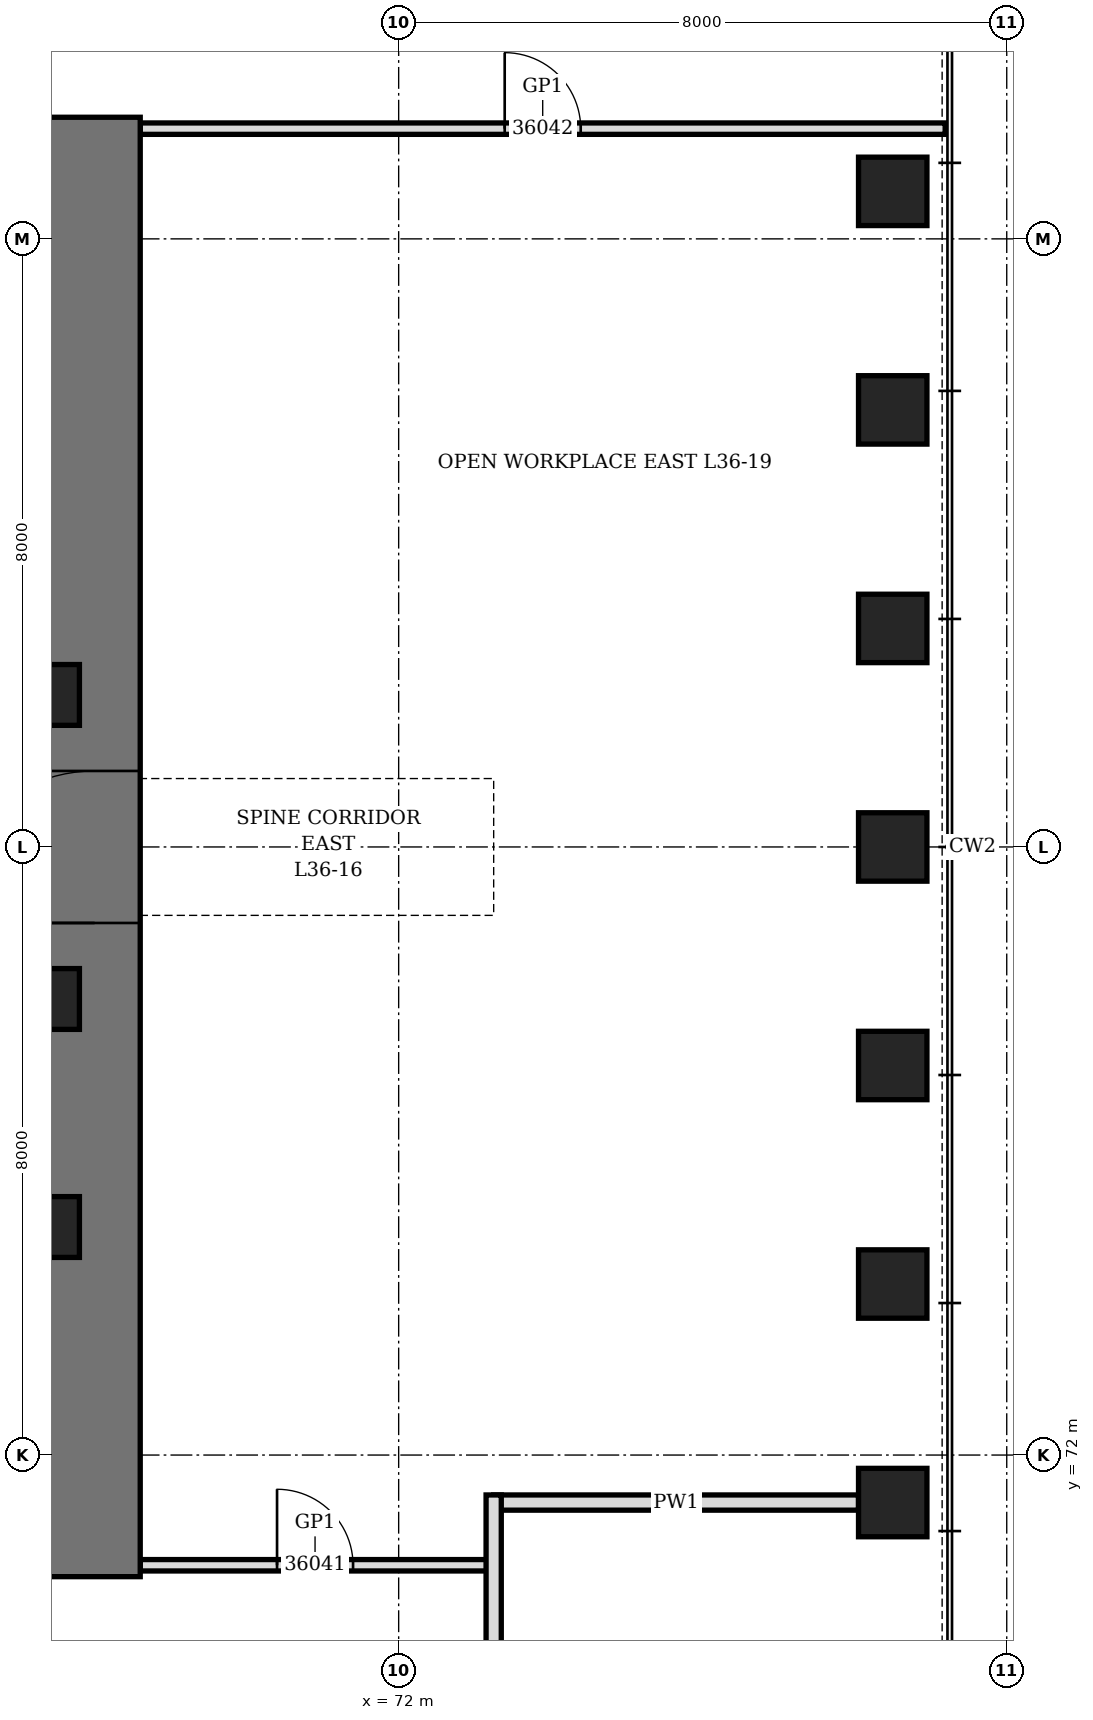
"""IFC4 building model, lengths in metres.
Left out: names, types, materials, properties, quantities, classifications, styles, units other than length and angle.
Written with IfcOpenShell. Run it as: python <this file> out.ifc"""

import sys

from ifc_helpers import new_model, si_unit, direction, frame, frame_2d, origin, origin_2d, place, context, subcontext, project, spatial, rectangle, hollow_rectangle, extrude, element, fill, save


model = new_model("IFC4")
c1 = context("Model", 3, precision=1e-05, world=origin(), true_north=direction((0.0, 1.0)))
c2 = subcontext(c1, "Body", "Model", "MODEL_VIEW")
j1 = project(units=[si_unit("LENGTHUNIT", "METRE"), si_unit("PLANEANGLEUNIT", "RADIAN")], contexts=[c1])
p1 = place(None, origin())
s1 = spatial("IfcSite", under=j1, at=p1, CompositionType="ELEMENT")
p2 = place(p1, origin())
s2 = spatial("IfcBuilding", under=s1, at=p2, CompositionType="ELEMENT")
p3 = place(p2, frame((0.0, 0.0, 162.7)))
s3 = spatial("IfcBuildingStorey", under=s2, at=p3, CompositionType="ELEMENT", Elevation=162.7)
for number, where, z_axis, x_axis in (
    (1, (78.5, 71.375, 0.0), (0.0, 0.0, 1.0), (0.0, 1.0, 0.0)),
    (2, (78.5, 74.25, 0.0), (0.0, 0.0, 1.0), (0.0, 1.0, 0.0)),
    (3, (78.5, 77.125, 0.0), (0.0, 0.0, 1.0), (0.0, 1.0, 0.0)),
    (4, (78.5, 80.0, 0.0), (0.0, 0.0, 1.0), (0.0, 1.0, 0.0)),
    (5, (78.5, 82.875, 0.0), (0.0, 0.0, 1.0), (0.0, 1.0, 0.0)),
    (6, (78.5, 85.75, 0.0), (0.0, 0.0, 1.0), (0.0, 1.0, 0.0)),
    (7, (78.5, 88.625, 0.0), (0.0, 0.0, 1.0), (0.0, 1.0, 0.0)),
):
    element("IfcColumn", number, at=place(p3, frame(where, z_axis=z_axis, x_axis=x_axis)), inside=s3, PredefinedType="COLUMN", context=c2, shape_type="SweptSolid", body=[
        extrude(hollow_rectangle(XDim=0.9, YDim=0.9, WallThickness=0.12, at=origin_2d()), origin(), (0.0, 0.0, 1.0), 4.2),
    ])
p4 = place(p3, frame((68.0, 70.4, 0.0), z_axis=(0.0, 0.0, 1.0), x_axis=(0.0, 1.0, 0.0)))
e8 = element("IfcWall", 8, at=p4, inside=s3, PredefinedType="SHEAR", context=c2, shape_type="SweptSolid", body=[
    extrude(rectangle(XDim=19.2, YDim=1.2, at=frame_2d((9.6, 0.0))), origin(), (0.0, 0.0, 1.0), 4.2),
])
p5 = place(p4, frame((8.6, 0.0, 0.0)))
e9 = element("IfcOpeningElement", 9, at=p5, cuts=e8, PredefinedType="OPENING", context=c2, shape_type="SweptSolid", body=[
    extrude(rectangle(XDim=2.0, YDim=2.4, at=frame_2d((1.0, 1.2))), frame((0.0, 0.61, 0.0), z_axis=(0.0, -1.0, 0.0), x_axis=(1.0, 0.0, 0.0)), (0.0, 0.0, 1.0), 1.22),
])
for number, where, z_axis, x_axis in (
    (10, (67.4, 75.0, 0.0), (0.0, 0.0, 1.0), (1.0, 0.0, 0.0)),
    (11, (67.4, 78.0, 0.0), (0.0, 0.0, 1.0), (1.0, 0.0, 0.0)),
    (12, (67.4, 82.0, 0.0), (0.0, 0.0, 1.0), (1.0, 0.0, 0.0)),
):
    element("IfcColumn", number, at=place(p3, frame(where, z_axis=z_axis, x_axis=x_axis)), inside=s3, PredefinedType="COLUMN", context=c2, shape_type="SweptSolid", body=[
        extrude(hollow_rectangle(XDim=0.8, YDim=0.8, WallThickness=0.1, at=origin_2d()), origin(), (0.0, 0.0, 1.0), 4.2),
    ])
p6 = place(p3, frame((73.25, 71.375, 0.0), z_axis=(0.0, 0.0, 1.0), x_axis=(1.0, 0.0, 0.0)))
e13 = element("IfcWall", 13, at=p6, inside=s3, PredefinedType="PARTITIONING", context=c2, shape_type="SweptSolid", body=[
    extrude(rectangle(XDim=4.8, YDim=0.2, at=frame_2d((2.4, 0.0))), origin(), (0.0, 0.0, 1.0), 3.428),
])
p7 = place(p3, frame((68.6, 70.55, 0.0), z_axis=(0.0, 0.0, 1.0), x_axis=(1.0, 0.0, 0.0)))
e14 = element("IfcWall", 14, at=p7, inside=s3, PredefinedType="PARTITIONING", context=c2, shape_type="SweptSolid", body=[
    extrude(rectangle(XDim=4.6, YDim=0.15, at=frame_2d((2.3, 0.0))), origin(), (0.0, 0.0, 1.0), 4.04),
])
p8 = place(p7, frame((1.8, 0.0, 0.0)))
e15 = element("IfcOpeningElement", 15, at=p8, cuts=e14, PredefinedType="OPENING", context=c2, shape_type="SweptSolid", body=[
    extrude(rectangle(XDim=1.0, YDim=2.4, at=frame_2d((0.5, 1.2))), frame((0.0, 0.085, 0.0), z_axis=(0.0, -1.0, 0.0), x_axis=(1.0, 0.0, 0.0)), (0.0, 0.0, 1.0), 0.17),
])
p9 = place(p3, frame((68.6, 89.45, 0.0), z_axis=(0.0, 0.0, 1.0), x_axis=(1.0, 0.0, 0.0)))
e16 = element("IfcWall", 16, at=p9, inside=s3, PredefinedType="PARTITIONING", context=c2, shape_type="SweptSolid", body=[
    extrude(rectangle(XDim=10.59, YDim=0.15, at=frame_2d((5.295, 0.0))), origin(), (0.0, 0.0, 1.0), 4.04),
])
p10 = place(p9, frame((4.795, 0.0, 0.0)))
e17 = element("IfcOpeningElement", 17, at=p10, cuts=e16, PredefinedType="OPENING", context=c2, shape_type="SweptSolid", body=[
    extrude(rectangle(XDim=1.0, YDim=2.4, at=frame_2d((0.5, 1.2))), frame((0.0, 0.085, 0.0), z_axis=(0.0, -1.0, 0.0), x_axis=(1.0, 0.0, 0.0)), (0.0, 0.0, 1.0), 0.17),
])
p11 = place(p3, frame((73.25, 63.2, 0.0), z_axis=(0.0, 0.0, 1.0), x_axis=(0.0, 1.0, 0.0)))
e18 = element("IfcWall", 18, at=p11, inside=s3, PredefinedType="PARTITIONING", context=c2, shape_type="SweptSolid", body=[
    extrude(rectangle(XDim=8.275, YDim=0.2, at=frame_2d((4.138, 0.0))), origin(), (0.0, 0.0, 1.0), 4.04),
])
p12 = place(p11, frame((3.363, 0.0, 0.0)))
e19 = element("IfcOpeningElement", 19, at=p12, cuts=e18, PredefinedType="OPENING", context=c2, shape_type="SweptSolid", body=[
    extrude(rectangle(XDim=1.0, YDim=2.1, at=frame_2d((0.5, 1.05))), frame((0.0, 0.11, 0.0), z_axis=(0.0, -1.0, 0.0), x_axis=(1.0, 0.0, 0.0)), (0.0, 0.0, 1.0), 0.22),
])
p13 = place(p5, origin())
e20 = element("IfcDoor", 20, at=p13, inside=s3, OperationType="DOUBLE_DOOR_SINGLE_SWING", PredefinedType="DOOR", context=c2, shape_type="SweptSolid", body=[
    extrude(rectangle(XDim=2.0, YDim=2.4, at=frame_2d((1.0, 1.2))), frame((0.0, 0.35, 0.0), z_axis=(0.0, -1.0, 0.0), x_axis=(1.0, 0.0, 0.0)), (0.0, 0.0, 1.0), 0.7),
])
fill(e9, e20)
p14 = place(p8, origin())
e21 = element("IfcDoor", 21, at=p14, inside=s3, OperationType="SINGLE_SWING_RIGHT", PredefinedType="DOOR", context=c2, shape_type="SweptSolid", body=[
    extrude(rectangle(XDim=1.0, YDim=2.4, at=frame_2d((0.5, 1.2))), frame((0.0, 0.075, 0.0), z_axis=(0.0, -1.0, 0.0), x_axis=(1.0, 0.0, 0.0)), (0.0, 0.0, 1.0), 0.149),
])
fill(e15, e21)
p15 = place(p10, origin())
e22 = element("IfcDoor", 22, at=p15, inside=s3, OperationType="SINGLE_SWING_RIGHT", PredefinedType="DOOR", context=c2, shape_type="SweptSolid", body=[
    extrude(rectangle(XDim=1.0, YDim=2.4, at=frame_2d((0.5, 1.2))), frame((0.0, 0.075, 0.0), z_axis=(0.0, -1.0, 0.0), x_axis=(1.0, 0.0, 0.0)), (0.0, 0.0, 1.0), 0.149),
])
fill(e17, e22)
save(model, sys.argv[1])
